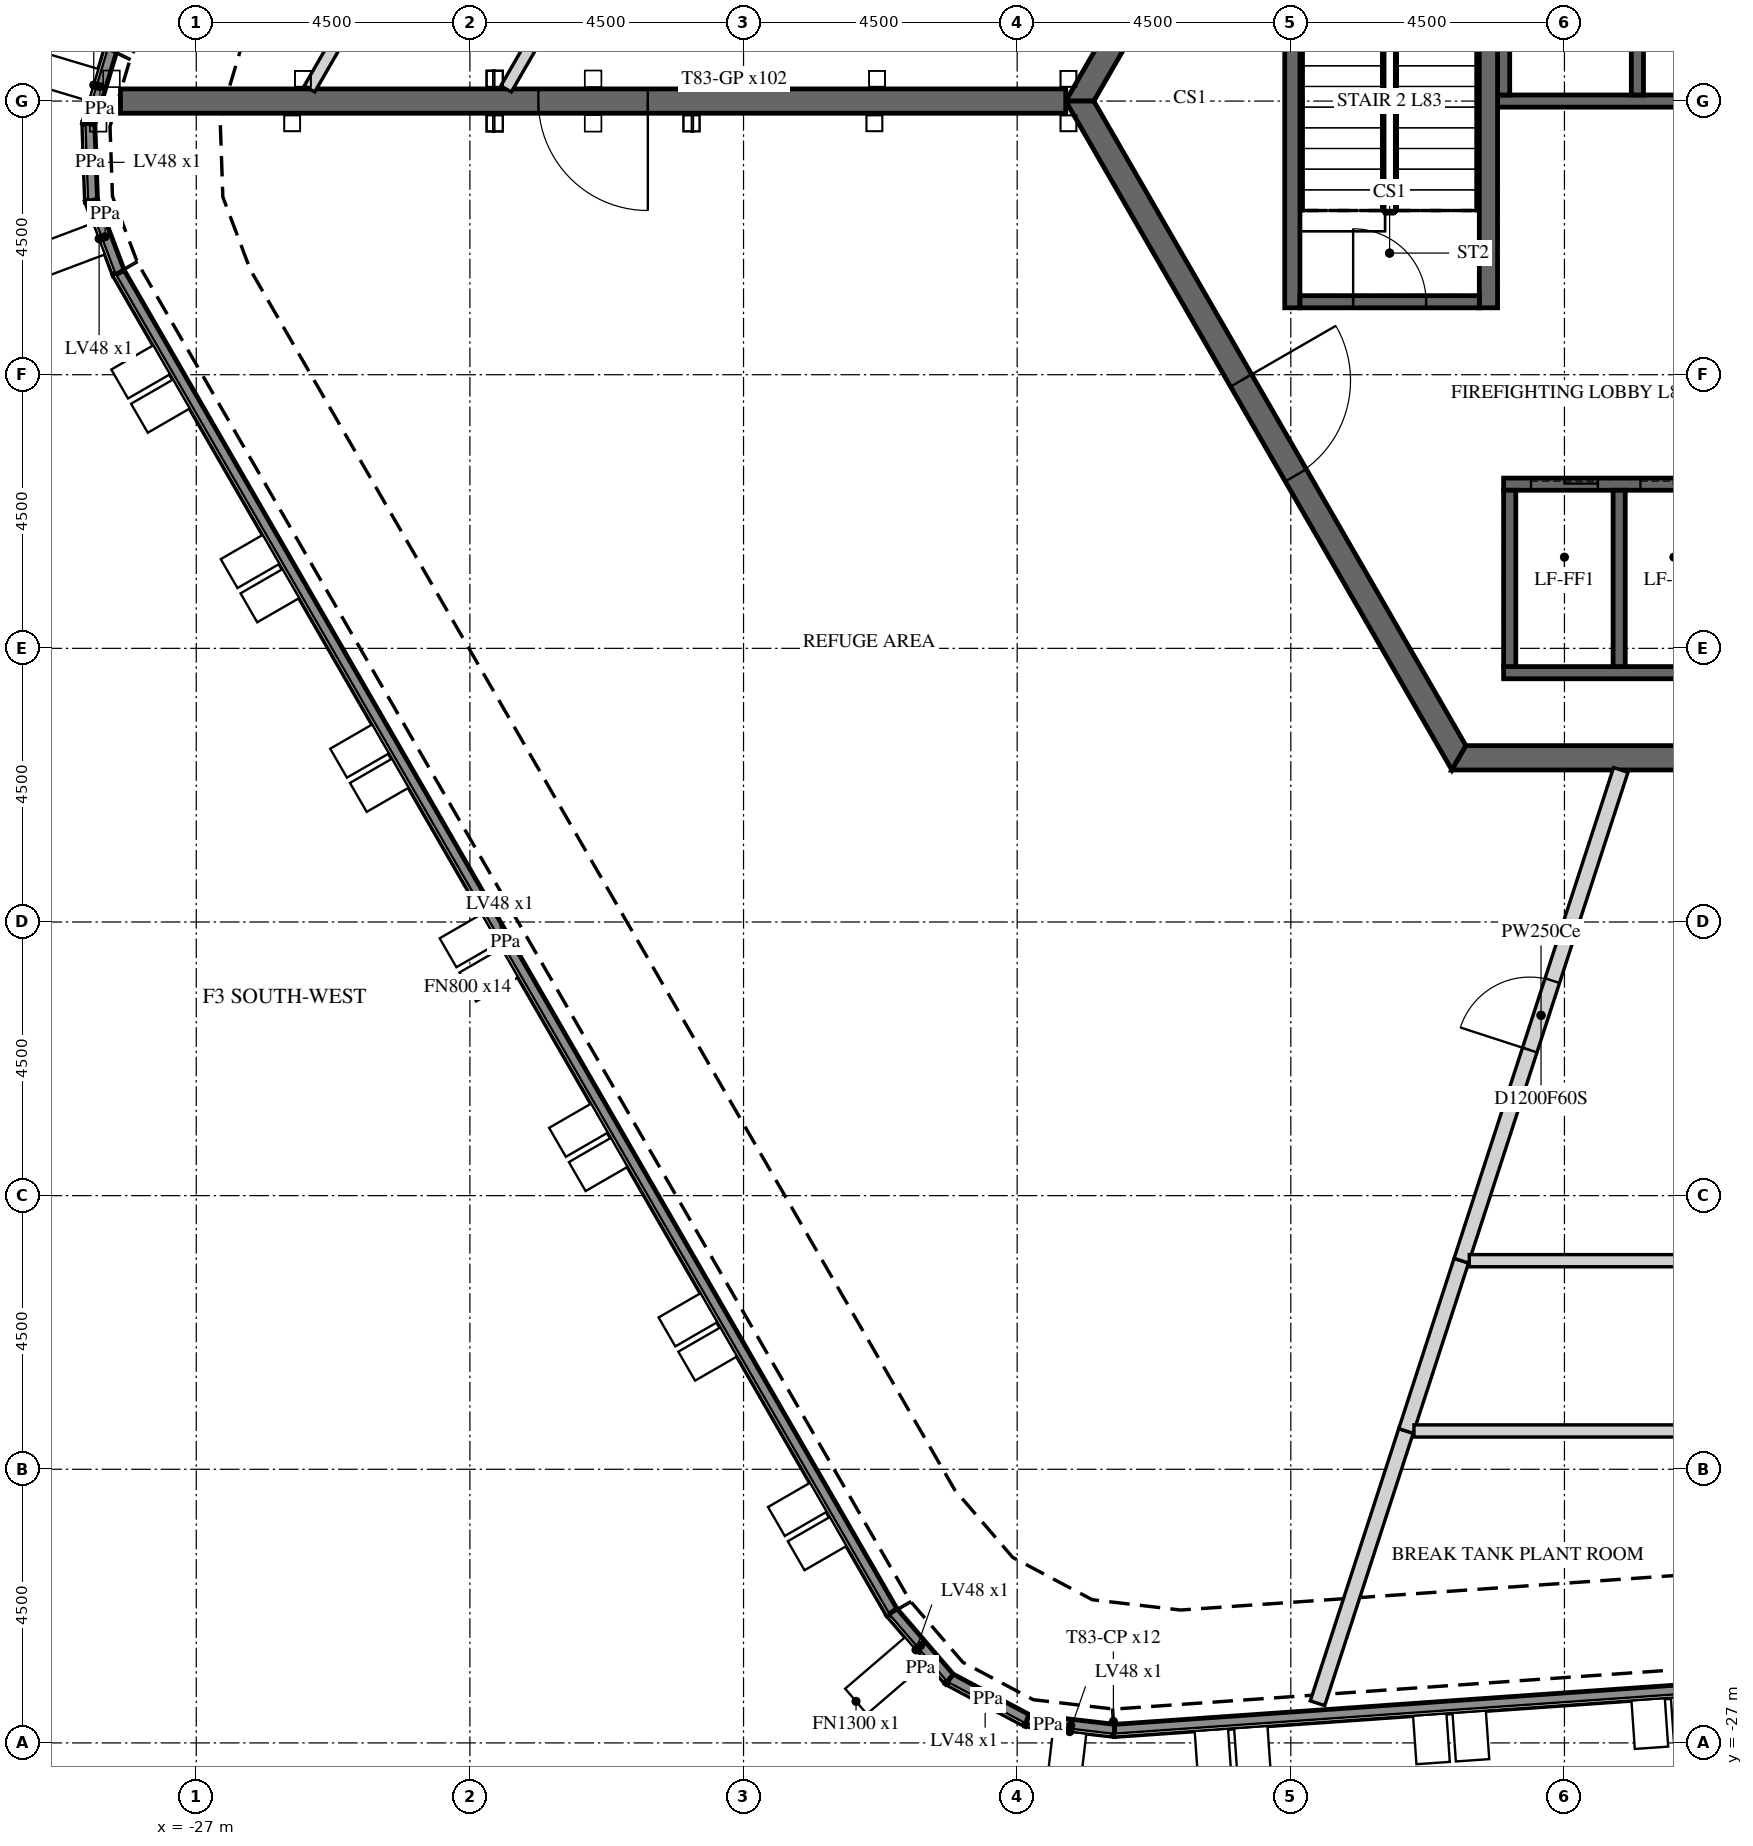
"""IFC4 building model, lengths in metres.
Left out: names, types, materials, properties, quantities, classifications, styles, units other than length and angle.
Written with IfcOpenShell. Run it as: python <this file> out.ifc"""

import sys

from ifc_helpers import new_model, si_unit, direction, frame, frame_2d, origin, place, context, subcontext, project, spatial, polyline, rectangle, outline, extrude, element, fill, save


model = new_model("IFC4")
c1 = context("Model", 3, precision=1e-05, world=origin(), true_north=direction((0.0, 1.0)))
c2 = subcontext(c1, "Body", "Model", "MODEL_VIEW")
j1 = project(units=[si_unit("LENGTHUNIT", "METRE"), si_unit("PLANEANGLEUNIT", "RADIAN")], contexts=[c1])
p1 = place(None, origin())
s1 = spatial("IfcSite", under=j1, at=p1, CompositionType="ELEMENT")
p2 = place(p1, origin())
s2 = spatial("IfcBuilding", under=s1, at=p2, CompositionType="ELEMENT")
p3 = place(p2, frame((0.0, 0.0, 343.5)))
s3 = spatial("IfcBuildingStorey", under=s2, at=p3, CompositionType="ELEMENT", Elevation=343.5)
p4 = place(p3, frame((13.468, -25.021, 5.7), z_axis=(0.0, 0.0, 1.0), x_axis=(-0.997564174518, -0.069754696747, 0.0)))
e1 = element("IfcWall", 1, at=p4, inside=s3, PredefinedType="PARAPET", context=c2, shape_type="SweptSolid", body=[
    extrude(outline(polyline([(0.008, -0.1), (25.418, -0.1), (25.437, 0.1), (-0.008, 0.1), (0.008, -0.1)])), origin(), (0.0, 0.0, 1.0), 1.1),
])
p5 = place(p3, frame((-11.898, -26.795, 5.7), z_axis=(0.0, 0.0, 1.0), x_axis=(-0.993231825369, 0.116148788514, 0.0)))
e2 = element("IfcWall", 2, at=p5, inside=s3, PredefinedType="PARAPET", context=c2, shape_type="SweptSolid", body=[
    extrude(outline(polyline([(0.009, -0.1), (1.434, -0.1), (1.471, 0.1), (-0.009, 0.1), (0.009, -0.1)])), origin(), (0.0, 0.0, 1.0), 1.1),
])
p6 = place(p3, frame((-13.34, -26.626, 5.7), z_axis=(0.0, 0.0, 1.0), x_axis=(-0.882946998442, 0.46947268072, 0.0)))
e3 = element("IfcWall", 3, at=p6, inside=s3, PredefinedType="PARAPET", context=c2, shape_type="SweptSolid", body=[
    extrude(outline(polyline([(0.019, -0.1), (1.424, -0.1), (1.462, 0.1), (-0.019, 0.1), (0.019, -0.1)])), origin(), (0.0, 0.0, 1.0), 1.1),
])
p7 = place(p3, frame((-14.615, -25.949, 5.7), z_axis=(0.0, 0.0, 1.0), x_axis=(-0.651732002744, 0.75844933687, 0.0)))
e4 = element("IfcWall", 4, at=p7, inside=s3, PredefinedType="PARAPET", context=c2, shape_type="SweptSolid", body=[
    extrude(outline(polyline([(0.019, -0.1), (1.443, -0.1), (1.462, 0.1), (-0.019, 0.1), (0.019, -0.1)])), origin(), (0.0, 0.0, 1.0), 1.1),
])
p8 = place(p3, frame((-15.561, -24.847, 5.7), z_axis=(0.0, 0.0, 1.0), x_axis=(-0.499995068022, 0.866028251245, 0.0)))
e5 = element("IfcWall", 5, at=p8, inside=s3, PredefinedType="PARAPET", context=c2, shape_type="SweptSolid", body=[
    extrude(outline(polyline([(0.009, -0.1), (25.419, -0.1), (25.435, 0.1), (-0.009, 0.1), (0.009, -0.1)])), origin(), (0.0, 0.0, 1.0), 1.1),
])
p9 = place(p3, frame((-28.275, -2.827, 5.7), z_axis=(0.0, 0.0, 1.0), x_axis=(-0.353098432582, 0.935586178237, 0.0)))
e6 = element("IfcWall", 6, at=p9, inside=s3, PredefinedType="PARAPET", context=c2, shape_type="SweptSolid", body=[
    extrude(outline(polyline([(0.008, -0.1), (1.257, -0.1), (1.289, 0.1), (-0.008, 0.1), (0.008, -0.1)])), origin(), (0.0, 0.0, 1.0), 1.1),
])
p10 = place(p3, frame((-28.724, -1.636, 5.7), z_axis=(0.0, 0.0, 1.0), x_axis=(-0.034748174227, 0.999396099846, 0.0)))
e7 = element("IfcWall", 7, at=p10, inside=s3, PredefinedType="PARAPET", context=c2, shape_type="SweptSolid", body=[
    extrude(outline(polyline([(0.016, -0.1), (1.248, -0.1), (1.281, 0.1), (-0.016, 0.1), (0.016, -0.1)])), origin(), (0.0, 0.0, 1.0), 1.1),
])
p11 = place(p3, frame((-28.768, -0.372, 5.7), z_axis=(0.0, 0.0, 1.0), x_axis=(0.286784667578, 0.957995070156, 0.0)))
e8 = element("IfcWall", 8, at=p11, inside=s3, PredefinedType="PARAPET", context=c2, shape_type="SweptSolid", body=[
    extrude(outline(polyline([(0.016, -0.1), (1.265, -0.1), (1.281, 0.1), (-0.016, 0.1), (0.016, -0.1)])), origin(), (0.0, 0.0, 1.0), 1.1),
])
p12 = place(p3, frame((-6.235, 10.8, -0.3), z_axis=(0.0, 0.0, 1.0), x_axis=(-0.499996419489, -0.866027470984, 0.0)))
e9 = element("IfcWall", 9, at=p12, inside=s3, PredefinedType="SHEAR", context=c2, shape_type="SweptSolid", body=[
    extrude(outline(polyline([(-0.115, -0.2), (12.586, -0.2), (12.355, 0.2), (0.115, 0.2), (-0.115, -0.2)])), origin(), (0.0, 0.0, 1.0), 5.8),
])
p13 = place(p12, frame((5.364, 0.0, 0.3)))
e10 = element("IfcOpeningElement", 10, at=p13, cuts=e9, PredefinedType="OPENING", context=c2, shape_type="SweptSolid", body=[
    extrude(rectangle(XDim=1.8, YDim=2.4, at=frame_2d((0.9, 1.2))), frame((0.0, 0.21, 0.0), z_axis=(0.0, -1.0, 0.0), x_axis=(1.0, 0.0, 0.0)), (0.0, 0.0, 1.0), 0.42),
])
p14 = place(p3, frame((-12.471, 0.0, -0.3), z_axis=(0.0, 0.0, 1.0), x_axis=(0.499996419489, -0.866027470984, 0.0)))
e11 = element("IfcWall", 11, at=p14, inside=s3, PredefinedType="SHEAR", context=c2, shape_type="SweptSolid", body=[
    extrude(outline(polyline([(-0.115, -0.2), (12.586, -0.2), (12.355, 0.2), (0.115, 0.2), (-0.115, -0.2)])), origin(), (0.0, 0.0, 1.0), 5.8),
])
p15 = place(p14, frame((5.306, 0.0, 0.3)))
e12 = element("IfcOpeningElement", 12, at=p15, cuts=e11, PredefinedType="OPENING", context=c2, shape_type="SweptSolid", body=[
    extrude(rectangle(XDim=1.8, YDim=2.4, at=frame_2d((0.9, 1.2))), frame((0.0, 0.21, 0.0), z_axis=(0.0, -1.0, 0.0), x_axis=(1.0, 0.0, 0.0)), (0.0, 0.0, 1.0), 0.42),
])
p16 = place(p3, frame((-6.235, -10.8, -0.3), z_axis=(0.0, 0.0, 1.0), x_axis=(1.0, 0.0, 0.0)))
e13 = element("IfcWall", 13, at=p16, inside=s3, PredefinedType="SHEAR", context=c2, shape_type="SweptSolid", body=[
    extrude(outline(polyline([(-0.115, -0.2), (12.586, -0.2), (12.355, 0.2), (0.115, 0.2), (-0.115, -0.2)])), origin(), (0.0, 0.0, 1.0), 5.8),
])
p17 = place(p3, frame((-12.702, 0.0, -0.3), z_axis=(0.0, 0.0, 1.0), x_axis=(-1.0, 0.0, 0.0)))
e14 = element("IfcWall", 14, at=p17, inside=s3, PredefinedType="SHEAR", context=c2, shape_type="SweptSolid", body=[
    extrude(rectangle(XDim=15.544, YDim=0.4, at=frame_2d((7.772, 0.0))), origin(), (0.0, 0.0, 1.0), 5.8),
])
p18 = place(p17, frame((6.872, 0.0, 0.3)))
e15 = element("IfcOpeningElement", 15, at=p18, cuts=e14, PredefinedType="OPENING", context=c2, shape_type="SweptSolid", body=[
    extrude(rectangle(XDim=1.8, YDim=2.4, at=frame_2d((0.9, 1.2))), frame((0.0, 0.21, 0.0), z_axis=(0.0, -1.0, 0.0), x_axis=(1.0, 0.0, 0.0)), (0.0, 0.0, 1.0), 0.42),
])
p19 = place(p3, frame((-5.6, 0.0, -0.25), z_axis=(0.0, 0.0, 1.0), x_axis=(1.0, 0.0, 0.0)))
e16 = element("IfcWall", 16, at=p19, inside=s3, PredefinedType="SHEAR", context=c2, shape_type="SweptSolid", body=[
    extrude(rectangle(XDim=11.2, YDim=0.2, at=frame_2d((5.6, 0.0))), origin(), (0.0, 0.0, 1.0), 5.75),
])
for number, where, z_axis, x_axis in (
    (17, (-5.5, 0.1, -0.25), (0.0, 0.0, 1.0), (0.0, 1.0, 0.0)),
    (18, (-3.3, 0.1, -0.25), (0.0, 0.0, 1.0), (0.0, 1.0, 0.0)),
):
    element("IfcWall", number, at=place(p3, frame(where, z_axis=z_axis, x_axis=x_axis)), inside=s3, PredefinedType="SHEAR", context=c2, shape_type="SweptSolid", body=[
        extrude(rectangle(XDim=3.1, YDim=0.2, at=frame_2d((1.55, 0.0))), origin(), (0.0, 0.0, 1.0), 5.75),
    ])
p20 = place(p3, frame((-5.5, -6.3, -0.25), z_axis=(0.0, 0.0, 1.0), x_axis=(1.0, 0.0, 0.0)))
e19 = element("IfcWall", 19, at=p20, inside=s3, PredefinedType="SHEAR", context=c2, shape_type="SweptSolid", body=[
    extrude(rectangle(XDim=9.2, YDim=0.2, at=frame_2d((4.6, 0.0))), origin(), (0.0, 0.0, 1.0), 5.75),
])
p21 = place(p20, frame((0.45, 0.0, 0.25)))
e20 = element("IfcOpeningElement", 20, at=p21, cuts=e19, PredefinedType="OPENING", context=c2, shape_type="SweptSolid", body=[
    extrude(rectangle(XDim=1.1, YDim=2.1, at=frame_2d((0.55, 1.05))), frame((0.0, 0.11, 0.0), z_axis=(0.0, -1.0, 0.0), x_axis=(1.0, 0.0, 0.0)), (0.0, 0.0, 1.0), 0.22),
])
p22 = place(p20, frame((2.25, 0.0, 0.25)))
e21 = element("IfcOpeningElement", 21, at=p22, cuts=e19, PredefinedType="OPENING", context=c2, shape_type="SweptSolid", body=[
    extrude(rectangle(XDim=1.1, YDim=2.1, at=frame_2d((0.55, 1.05))), frame((0.0, 0.11, 0.0), z_axis=(0.0, -1.0, 0.0), x_axis=(1.0, 0.0, 0.0)), (0.0, 0.0, 1.0), 0.22),
])
p23 = place(p20, frame((4.05, 0.0, 0.25)))
e22 = element("IfcOpeningElement", 22, at=p23, cuts=e19, PredefinedType="OPENING", context=c2, shape_type="SweptSolid", body=[
    extrude(rectangle(XDim=1.1, YDim=2.1, at=frame_2d((0.55, 1.05))), frame((0.0, 0.11, 0.0), z_axis=(0.0, -1.0, 0.0), x_axis=(1.0, 0.0, 0.0)), (0.0, 0.0, 1.0), 0.22),
])
p24 = place(p20, frame((5.85, 0.0, 0.25)))
e23 = element("IfcOpeningElement", 23, at=p24, cuts=e19, PredefinedType="OPENING", context=c2, shape_type="SweptSolid", body=[
    extrude(rectangle(XDim=1.1, YDim=2.1, at=frame_2d((0.55, 1.05))), frame((0.0, 0.11, 0.0), z_axis=(0.0, -1.0, 0.0), x_axis=(1.0, 0.0, 0.0)), (0.0, 0.0, 1.0), 0.22),
])
p25 = place(p20, frame((7.65, 0.0, 0.25)))
e24 = element("IfcOpeningElement", 24, at=p25, cuts=e19, PredefinedType="OPENING", context=c2, shape_type="SweptSolid", body=[
    extrude(rectangle(XDim=1.1, YDim=2.1, at=frame_2d((0.55, 1.05))), frame((0.0, 0.11, 0.0), z_axis=(0.0, -1.0, 0.0), x_axis=(1.0, 0.0, 0.0)), (0.0, 0.0, 1.0), 0.22),
])
p26 = place(p3, frame((-5.5, -9.4, -0.25), z_axis=(0.0, 0.0, 1.0), x_axis=(1.0, 0.0, 0.0)))
e25 = element("IfcWall", 25, at=p26, inside=s3, PredefinedType="SHEAR", context=c2, shape_type="SweptSolid", body=[
    extrude(rectangle(XDim=9.2, YDim=0.2, at=frame_2d((4.6, 0.0))), origin(), (0.0, 0.0, 1.0), 5.75),
])
for number, where, z_axis, x_axis in (
    (26, (-5.4, -9.3, -0.25), (0.0, 0.0, 1.0), (0.0, 1.0, 0.0)),
    (27, (-3.6, -9.3, -0.25), (0.0, 0.0, 1.0), (0.0, 1.0, 0.0)),
):
    element("IfcWall", number, at=place(p3, frame(where, z_axis=z_axis, x_axis=x_axis)), inside=s3, PredefinedType="SHEAR", context=c2, shape_type="SweptSolid", body=[
        extrude(rectangle(XDim=2.9, YDim=0.2, at=frame_2d((1.45, 0.0))), origin(), (0.0, 0.0, 1.0), 5.75),
    ])
p27 = place(p3, frame((-5.75, -3.4, -0.25), z_axis=(0.0, 0.0, 1.0), x_axis=(0.0, 1.0, 0.0)))
e28 = element("IfcWall", 28, at=p27, inside=s3, PredefinedType="SHEAR", context=c2, shape_type="SweptSolid", body=[
    extrude(rectangle(XDim=6.8, YDim=0.3, at=frame_2d((3.4, 0.0))), origin(), (0.0, 0.0, 1.0), 5.75),
])
p28 = place(p3, frame((-8.975, -3.4, -0.25), z_axis=(0.0, 0.0, 1.0), x_axis=(0.0, 1.0, 0.0)))
e29 = element("IfcWall", 29, at=p28, inside=s3, PredefinedType="SHEAR", context=c2, shape_type="SweptSolid", body=[
    extrude(rectangle(XDim=6.8, YDim=0.25, at=frame_2d((3.4, 0.0))), origin(), (0.0, 0.0, 1.0), 5.75),
])
p29 = place(p3, frame((-8.85, -3.3, -0.25), z_axis=(0.0, 0.0, 1.0), x_axis=(1.0, 0.0, 0.0)))
e30 = element("IfcWall", 30, at=p29, inside=s3, PredefinedType="SHEAR", context=c2, shape_type="SweptSolid", body=[
    extrude(rectangle(XDim=2.95, YDim=0.2, at=frame_2d((1.475, 0.0))), origin(), (0.0, 0.0, 1.0), 5.75),
])
p30 = place(p29, frame((0.875, 0.0, 0.25)))
e31 = element("IfcOpeningElement", 31, at=p30, cuts=e30, PredefinedType="OPENING", context=c2, shape_type="SweptSolid", body=[
    extrude(rectangle(XDim=1.2, YDim=2.4, at=frame_2d((0.6, 1.2))), frame((0.0, 0.11, 0.0), z_axis=(0.0, -1.0, 0.0), x_axis=(1.0, 0.0, 0.0)), (0.0, 0.0, 1.0), 0.22),
])
p31 = place(p3, frame((-25.138, 0.2, 0.0), z_axis=(0.0, 0.0, 1.0), x_axis=(0.499976837575, 0.866038776204, 0.0)))
e32 = element("IfcWall", 32, at=p31, inside=s3, PredefinedType="PARTITIONING", context=c2, shape_type="SweptSolid", body=[
    extrude(rectangle(XDim=14.594, YDim=0.2, at=frame_2d((7.297, 0.0))), origin(), (0.0, 0.0, 1.0), 5.5),
])
p32 = place(p31, frame((6.797, 0.0, 0.0)))
e33 = element("IfcOpeningElement", 33, at=p32, cuts=e32, PredefinedType="OPENING", context=c2, shape_type="SweptSolid", body=[
    extrude(rectangle(XDim=1.0, YDim=2.1, at=frame_2d((0.5, 1.05))), frame((0.0, 0.11, 0.0), z_axis=(0.0, -1.0, 0.0), x_axis=(1.0, 0.0, 0.0)), (0.0, 0.0, 1.0), 0.22),
])
p33 = place(p3, frame((-11.01, 19.07, 0.0), z_axis=(0.0, 0.0, 1.0), x_axis=(-0.500012125972, -0.866018402738, 0.0)))
e34 = element("IfcWall", 34, at=p33, inside=s3, PredefinedType="PARTITIONING", context=c2, shape_type="SweptSolid", body=[
    extrude(rectangle(XDim=21.79, YDim=0.2, at=frame_2d((10.895, 0.0))), origin(), (0.0, 0.0, 1.0), 5.5),
])
p34 = place(p33, frame((10.295, 0.0, 0.0)))
e35 = element("IfcOpeningElement", 35, at=p34, cuts=e34, PredefinedType="OPENING", context=c2, shape_type="SweptSolid", body=[
    extrude(rectangle(XDim=1.2, YDim=2.1, at=frame_2d((0.6, 1.05))), frame((0.0, 0.11, 0.0), z_axis=(0.0, -1.0, 0.0), x_axis=(1.0, 0.0, 0.0)), (0.0, 0.0, 1.0), 0.22),
])
p35 = place(p3, frame((-8.561, -26.347, 0.0), z_axis=(0.0, 0.0, 1.0), x_axis=(0.309046200701, 0.951047026089, 0.0)))
e36 = element("IfcWall", 36, at=p35, inside=s3, PredefinedType="PARTITIONING", context=c2, shape_type="SweptSolid", body=[
    extrude(rectangle(XDim=4.708, YDim=0.25, at=frame_2d((2.354, 0.0))), origin(), (0.0, 0.0, 1.0), 5.5),
])
p36 = place(p3, frame((-7.106, -21.87, 0.0), z_axis=(0.0, 0.0, 1.0), x_axis=(0.309054196713, 0.951044427718, 0.0)))
e37 = element("IfcWall", 37, at=p36, inside=s3, PredefinedType="PARTITIONING", context=c2, shape_type="SweptSolid", body=[
    extrude(rectangle(XDim=2.944, YDim=0.25, at=frame_2d((1.472, 0.0))), origin(), (0.0, 0.0, 1.0), 5.5),
])
p37 = place(p3, frame((3.229, -21.87, 0.0), z_axis=(0.0, 0.0, 1.0), x_axis=(-1.0, 0.0, 0.0)))
e38 = element("IfcWall", 38, at=p37, inside=s3, PredefinedType="PARTITIONING", context=c2, shape_type="SweptSolid", body=[
    extrude(rectangle(XDim=10.204, YDim=0.2, at=frame_2d((5.102, 0.0))), origin(), (0.0, 0.0, 1.0), 5.5),
])
p38 = place(p37, frame((4.602, 0.0, 0.0)))
e39 = element("IfcOpeningElement", 39, at=p38, cuts=e38, PredefinedType="OPENING", context=c2, shape_type="SweptSolid", body=[
    extrude(rectangle(XDim=1.0, YDim=2.1, at=frame_2d((0.5, 1.05))), frame((0.0, 0.11, 0.0), z_axis=(0.0, -1.0, 0.0), x_axis=(1.0, 0.0, 0.0)), (0.0, 0.0, 1.0), 0.22),
])
p39 = place(p3, frame((-6.196, -19.07, 0.0), z_axis=(0.0, 0.0, 1.0), x_axis=(0.309011254429, 0.951058381298, 0.0)))
e40 = element("IfcWall", 40, at=p39, inside=s3, PredefinedType="PARTITIONING", context=c2, shape_type="SweptSolid", body=[
    extrude(rectangle(XDim=8.485, YDim=0.25, at=frame_2d((4.243, 0.0))), origin(), (0.0, 0.0, 1.0), 5.5),
])
p40 = place(p39, frame((3.643, 0.0, 0.0)))
e41 = element("IfcOpeningElement", 41, at=p40, cuts=e40, PredefinedType="OPENING", context=c2, shape_type="SweptSolid", body=[
    extrude(rectangle(XDim=1.2, YDim=2.1, at=frame_2d((0.6, 1.05))), frame((0.0, 0.135, 0.0), z_axis=(0.0, -1.0, 0.0), x_axis=(1.0, 0.0, 0.0)), (0.0, 0.0, 1.0), 0.27),
])
p41 = place(p3, frame((-6.064, -19.07, 0.0), z_axis=(0.0, 0.0, 1.0), x_axis=(1.0, 0.0, 0.0)))
e42 = element("IfcWall", 42, at=p41, inside=s3, PredefinedType="PARTITIONING", context=c2, shape_type="SweptSolid", body=[
    extrude(rectangle(XDim=16.844, YDim=0.2, at=frame_2d((8.422, 0.0))), origin(), (0.0, 0.0, 1.0), 5.5),
])
p42 = place(p41, frame((7.822, 0.0, 0.0)))
e43 = element("IfcOpeningElement", 43, at=p42, cuts=e42, PredefinedType="OPENING", context=c2, shape_type="SweptSolid", body=[
    extrude(rectangle(XDim=1.2, YDim=2.1, at=frame_2d((0.6, 1.05))), frame((0.0, 0.11, 0.0), z_axis=(0.0, -1.0, 0.0), x_axis=(1.0, 0.0, 0.0)), (0.0, 0.0, 1.0), 0.22),
])
p43 = place(p15, origin())
e44 = element("IfcDoor", 44, at=p43, inside=s3, OperationType="DOUBLE_DOOR_SINGLE_SWING", PredefinedType="DOOR", context=c2, shape_type="SweptSolid", body=[
    extrude(rectangle(XDim=1.8, YDim=2.4, at=frame_2d((0.9, 1.2))), frame((0.0, 0.025, 0.0), z_axis=(0.0, -1.0, 0.0), x_axis=(1.0, 0.0, 0.0)), (0.0, 0.0, 1.0), 0.05),
])
fill(e12, e44)
p44 = place(p18, origin())
e45 = element("IfcDoor", 45, at=p44, inside=s3, OperationType="DOUBLE_DOOR_SINGLE_SWING", PredefinedType="DOOR", context=c2, shape_type="SweptSolid", body=[
    extrude(rectangle(XDim=1.8, YDim=2.4, at=frame_2d((0.9, 1.2))), frame((0.0, 0.025, 0.0), z_axis=(0.0, -1.0, 0.0), x_axis=(1.0, 0.0, 0.0)), (0.0, 0.0, 1.0), 0.05),
])
fill(e15, e45)
p45 = place(p30, origin())
e46 = element("IfcDoor", 46, at=p45, inside=s3, OperationType="SINGLE_SWING_LEFT", PredefinedType="DOOR", context=c2, shape_type="SweptSolid", body=[
    extrude(rectangle(XDim=1.2, YDim=2.4, at=frame_2d((0.6, 1.2))), frame((0.0, 0.025, 0.0), z_axis=(0.0, -1.0, 0.0), x_axis=(1.0, 0.0, 0.0)), (0.0, 0.0, 1.0), 0.05),
])
fill(e31, e46)
p46 = place(p21, origin())
e47 = element("IfcDoor", 47, at=p46, inside=s3, OperationType="SLIDING_TO_LEFT", PredefinedType="DOOR", context=c2, shape_type="SweptSolid", body=[
    extrude(rectangle(XDim=1.1, YDim=2.1, at=frame_2d((0.55, 1.05))), frame((0.0, 0.025, 0.0), z_axis=(0.0, -1.0, 0.0), x_axis=(1.0, 0.0, 0.0)), (0.0, 0.0, 1.0), 0.05),
])
fill(e20, e47)
p47 = place(p22, origin())
e48 = element("IfcDoor", 48, at=p47, inside=s3, OperationType="SLIDING_TO_LEFT", PredefinedType="DOOR", context=c2, shape_type="SweptSolid", body=[
    extrude(rectangle(XDim=1.1, YDim=2.1, at=frame_2d((0.55, 1.05))), frame((0.0, 0.025, 0.0), z_axis=(0.0, -1.0, 0.0), x_axis=(1.0, 0.0, 0.0)), (0.0, 0.0, 1.0), 0.05),
])
fill(e21, e48)
p48 = place(p40, origin())
e49 = element("IfcDoor", 49, at=p48, inside=s3, OperationType="SINGLE_SWING_RIGHT", PredefinedType="DOOR", context=c2, shape_type="SweptSolid", body=[
    extrude(rectangle(XDim=1.2, YDim=2.1, at=frame_2d((0.6, 1.05))), frame((0.0, 0.025, 0.0), z_axis=(0.0, -1.0, 0.0), x_axis=(1.0, 0.0, 0.0)), (0.0, 0.0, 1.0), 0.05),
])
fill(e41, e49)
save(model, sys.argv[1])
